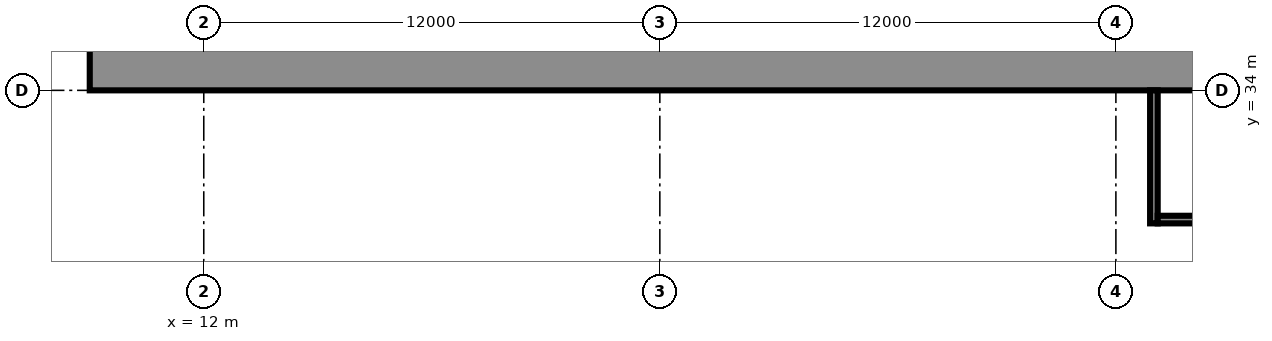
"""IFC4 building model, lengths in metres.
Left out: names, types, materials, properties, quantities, classifications, styles, units other than length and angle.
Written with IfcOpenShell. Run it as: python <this file> out.ifc"""

import sys

from ifc_helpers import new_model, si_unit, direction, frame, frame_2d, origin, origin_2d, place, context, subcontext, project, spatial, rectangle, extrude, element, fill, save


model = new_model("IFC4")
c1 = context("Model", 3, precision=1e-05, world=origin(), true_north=direction((0.0, 1.0)))
c2 = subcontext(c1, "Body", "Model", "MODEL_VIEW")
j1 = project(units=[si_unit("LENGTHUNIT", "METRE"), si_unit("PLANEANGLEUNIT", "RADIAN")], contexts=[c1])
p1 = place(None, origin())
s1 = spatial("IfcSite", under=j1, at=p1, CompositionType="ELEMENT")
p2 = place(p1, origin())
s2 = spatial("IfcBuilding", under=s1, at=p2, CompositionType="ELEMENT")
p3 = place(p2, origin())
s3 = spatial("IfcBuildingStorey", under=s2, at=p3, CompositionType="ELEMENT", Elevation=0.0)
for number, where, z_axis, x_axis in (
    (1, (28.0, 32.0, 0.0), (0.0, 0.0, 1.0), (1.0, 0.0, 0.0)),
    (2, (16.0, 32.0, 0.0), (0.0, 0.0, 1.0), (1.0, 0.0, 0.0)),
    (3, (8.0, 32.0, 0.0), (0.0, 0.0, 1.0), (1.0, 0.0, 0.0)),
):
    element("IfcColumn", number, at=place(p3, frame(where, z_axis=z_axis, x_axis=x_axis)), inside=s3, PredefinedType="COLUMN", context=c2, shape_type="SweptSolid", body=[
        extrude(rectangle(XDim=1.0, YDim=1.0, at=origin_2d()), origin(), (0.0, 0.0, 1.0), 8.0),
    ])
p4 = place(p3, frame((9.0, 34.6, 0.0), z_axis=(0.0, 0.0, 1.0), x_axis=(1.0, 0.0, 0.0)))
e4 = element("IfcWall", 4, at=p4, inside=s3, PredefinedType="SHEAR", context=c2, shape_type="SweptSolid", body=[
    extrude(rectangle(XDim=56.0, YDim=1.2, at=frame_2d((28.0, 0.0))), origin(), (0.0, 0.0, 1.0), 7.7),
])
p5 = place(p4, frame((3.3, 0.0, 0.0)))
e5 = element("IfcOpeningElement", 5, at=p5, cuts=e4, PredefinedType="OPENING", context=c2, shape_type="SweptSolid", body=[
    extrude(rectangle(XDim=1.0, YDim=2.1, at=frame_2d((0.5, 1.05))), frame((0.0, 0.61, 0.0), z_axis=(0.0, -1.0, 0.0), x_axis=(1.0, 0.0, 0.0)), (0.0, 0.0, 1.0), 1.22),
])
p6 = place(p4, frame((7.867, 0.0, 0.0)))
e6 = element("IfcOpeningElement", 6, at=p6, cuts=e4, PredefinedType="OPENING", context=c2, shape_type="SweptSolid", body=[
    extrude(rectangle(XDim=1.1, YDim=2.1, at=frame_2d((0.55, 1.05))), frame((0.0, 0.61, 0.0), z_axis=(0.0, -1.0, 0.0), x_axis=(1.0, 0.0, 0.0)), (0.0, 0.0, 1.0), 1.22),
])
p7 = place(p4, frame((12.033, 0.0, 0.0)))
e7 = element("IfcOpeningElement", 7, at=p7, cuts=e4, PredefinedType="OPENING", context=c2, shape_type="SweptSolid", body=[
    extrude(rectangle(XDim=1.1, YDim=2.1, at=frame_2d((0.55, 1.05))), frame((0.0, 0.61, 0.0), z_axis=(0.0, -1.0, 0.0), x_axis=(1.0, 0.0, 0.0)), (0.0, 0.0, 1.0), 1.22),
])
p8 = place(p4, frame((9.8, 0.0, 0.0)))
e8 = element("IfcOpeningElement", 8, at=p8, cuts=e4, PredefinedType="OPENING", context=c2, shape_type="SweptSolid", body=[
    extrude(rectangle(XDim=1.4, YDim=2.1, at=frame_2d((0.7, 1.05))), frame((0.0, 0.61, 0.0), z_axis=(0.0, -1.0, 0.0), x_axis=(1.0, 0.0, 0.0)), (0.0, 0.0, 1.0), 1.22),
])
p9 = place(p4, frame((14.65, 0.0, 0.0)))
e9 = element("IfcOpeningElement", 9, at=p9, cuts=e4, PredefinedType="OPENING", context=c2, shape_type="SweptSolid", body=[
    extrude(rectangle(XDim=1.2, YDim=2.1, at=frame_2d((0.6, 1.05))), frame((0.0, 0.61, 0.0), z_axis=(0.0, -1.0, 0.0), x_axis=(1.0, 0.0, 0.0)), (0.0, 0.0, 1.0), 1.22),
])
p10 = place(p4, frame((21.867, 0.0, 0.0)))
e10 = element("IfcOpeningElement", 10, at=p10, cuts=e4, PredefinedType="OPENING", context=c2, shape_type="SweptSolid", body=[
    extrude(rectangle(XDim=1.1, YDim=2.1, at=frame_2d((0.55, 1.05))), frame((0.0, 0.61, 0.0), z_axis=(0.0, -1.0, 0.0), x_axis=(1.0, 0.0, 0.0)), (0.0, 0.0, 1.0), 1.22),
])
p11 = place(p4, frame((26.033, 0.0, 0.0)))
e11 = element("IfcOpeningElement", 11, at=p11, cuts=e4, PredefinedType="OPENING", context=c2, shape_type="SweptSolid", body=[
    extrude(rectangle(XDim=1.1, YDim=2.1, at=frame_2d((0.55, 1.05))), frame((0.0, 0.61, 0.0), z_axis=(0.0, -1.0, 0.0), x_axis=(1.0, 0.0, 0.0)), (0.0, 0.0, 1.0), 1.22),
])
p12 = place(p4, frame((23.8, 0.0, 0.0)))
e12 = element("IfcOpeningElement", 12, at=p12, cuts=e4, PredefinedType="OPENING", context=c2, shape_type="SweptSolid", body=[
    extrude(rectangle(XDim=1.4, YDim=2.1, at=frame_2d((0.7, 1.05))), frame((0.0, 0.61, 0.0), z_axis=(0.0, -1.0, 0.0), x_axis=(1.0, 0.0, 0.0)), (0.0, 0.0, 1.0), 1.22),
])
p13 = place(p4, frame((28.867, 0.0, 0.0)))
e13 = element("IfcOpeningElement", 13, at=p13, cuts=e4, PredefinedType="OPENING", context=c2, shape_type="SweptSolid", body=[
    extrude(rectangle(XDim=1.1, YDim=2.1, at=frame_2d((0.55, 1.05))), frame((0.0, 0.61, 0.0), z_axis=(0.0, -1.0, 0.0), x_axis=(1.0, 0.0, 0.0)), (0.0, 0.0, 1.0), 1.22),
])
p14 = place(p4, frame((33.033, 0.0, 0.0)))
e14 = element("IfcOpeningElement", 14, at=p14, cuts=e4, PredefinedType="OPENING", context=c2, shape_type="SweptSolid", body=[
    extrude(rectangle(XDim=1.1, YDim=2.1, at=frame_2d((0.55, 1.05))), frame((0.0, 0.61, 0.0), z_axis=(0.0, -1.0, 0.0), x_axis=(1.0, 0.0, 0.0)), (0.0, 0.0, 1.0), 1.22),
])
p15 = place(p4, frame((40.15, 0.0, 0.0)))
e15 = element("IfcOpeningElement", 15, at=p15, cuts=e4, PredefinedType="OPENING", context=c2, shape_type="SweptSolid", body=[
    extrude(rectangle(XDim=1.2, YDim=2.1, at=frame_2d((0.6, 1.05))), frame((0.0, 0.61, 0.0), z_axis=(0.0, -1.0, 0.0), x_axis=(1.0, 0.0, 0.0)), (0.0, 0.0, 1.0), 1.22),
])
p16 = place(p4, frame((42.867, 0.0, 0.0)))
e16 = element("IfcOpeningElement", 16, at=p16, cuts=e4, PredefinedType="OPENING", context=c2, shape_type="SweptSolid", body=[
    extrude(rectangle(XDim=1.1, YDim=2.1, at=frame_2d((0.55, 1.05))), frame((0.0, 0.61, 0.0), z_axis=(0.0, -1.0, 0.0), x_axis=(1.0, 0.0, 0.0)), (0.0, 0.0, 1.0), 1.22),
])
p17 = place(p4, frame((47.033, 0.0, 0.0)))
e17 = element("IfcOpeningElement", 17, at=p17, cuts=e4, PredefinedType="OPENING", context=c2, shape_type="SweptSolid", body=[
    extrude(rectangle(XDim=1.1, YDim=2.1, at=frame_2d((0.55, 1.05))), frame((0.0, 0.61, 0.0), z_axis=(0.0, -1.0, 0.0), x_axis=(1.0, 0.0, 0.0)), (0.0, 0.0, 1.0), 1.22),
])
p18 = place(p4, frame((44.8, 0.0, 0.0)))
e18 = element("IfcOpeningElement", 18, at=p18, cuts=e4, PredefinedType="OPENING", context=c2, shape_type="SweptSolid", body=[
    extrude(rectangle(XDim=1.4, YDim=2.1, at=frame_2d((0.7, 1.05))), frame((0.0, 0.61, 0.0), z_axis=(0.0, -1.0, 0.0), x_axis=(1.0, 0.0, 0.0)), (0.0, 0.0, 1.0), 1.22),
])
p19 = place(p4, frame((49.867, 0.0, 0.0)))
e19 = element("IfcOpeningElement", 19, at=p19, cuts=e4, PredefinedType="OPENING", context=c2, shape_type="SweptSolid", body=[
    extrude(rectangle(XDim=1.1, YDim=2.1, at=frame_2d((0.55, 1.05))), frame((0.0, 0.61, 0.0), z_axis=(0.0, -1.0, 0.0), x_axis=(1.0, 0.0, 0.0)), (0.0, 0.0, 1.0), 1.22),
])
p20 = place(p4, frame((53.5, 0.0, 0.0)))
e20 = element("IfcOpeningElement", 20, at=p20, cuts=e4, PredefinedType="OPENING", context=c2, shape_type="SweptSolid", body=[
    extrude(rectangle(XDim=1.1, YDim=2.1, at=frame_2d((0.55, 1.05))), frame((0.0, 0.61, 0.0), z_axis=(0.0, -1.0, 0.0), x_axis=(1.0, 0.0, 0.0)), (0.0, 0.0, 1.0), 1.22),
])
p21 = place(p4, frame((51.567, 0.0, 0.0)))
e21 = element("IfcOpeningElement", 21, at=p21, cuts=e4, PredefinedType="OPENING", context=c2, shape_type="SweptSolid", body=[
    extrude(rectangle(XDim=1.4, YDim=2.1, at=frame_2d((0.7, 1.05))), frame((0.0, 0.61, 0.0), z_axis=(0.0, -1.0, 0.0), x_axis=(1.0, 0.0, 0.0)), (0.0, 0.0, 1.0), 1.22),
])
p22 = place(p3, frame((37.0, 30.5, 0.0), z_axis=(0.0, 0.0, 1.0), x_axis=(0.0, 1.0, 0.0)))
e22 = element("IfcWall", 22, at=p22, inside=s3, PredefinedType="PARTITIONING", context=c2, shape_type="SweptSolid", body=[
    extrude(rectangle(XDim=3.5, YDim=0.2, at=frame_2d((1.75, 0.0))), origin(), (0.0, 0.0, 1.0), 7.7),
])
p23 = place(p22, frame((1.2, 0.0, 0.0)))
e23 = element("IfcOpeningElement", 23, at=p23, cuts=e22, PredefinedType="OPENING", context=c2, shape_type="SweptSolid", body=[
    extrude(rectangle(XDim=1.1, YDim=2.1, at=frame_2d((0.55, 1.05))), frame((0.0, 0.11, 0.0), z_axis=(0.0, -1.0, 0.0), x_axis=(1.0, 0.0, 0.0)), (0.0, 0.0, 1.0), 0.22),
])
p24 = place(p3, frame((37.1, 30.6, 0.0), z_axis=(0.0, 0.0, 1.0), x_axis=(1.0, 0.0, 0.0)))
e24 = element("IfcWall", 24, at=p24, inside=s3, PredefinedType="PARTITIONING", context=c2, shape_type="SweptSolid", body=[
    extrude(rectangle(XDim=2.8, YDim=0.2, at=frame_2d((1.4, 0.0))), origin(), (0.0, 0.0, 1.0), 7.7),
])
p25 = place(p5, origin())
e25 = element("IfcDoor", 25, at=p25, inside=s3, OperationType="SINGLE_SWING_LEFT", PredefinedType="DOOR", context=c2, shape_type="SweptSolid", body=[
    extrude(rectangle(XDim=1.0, YDim=2.1, at=frame_2d((0.5, 1.05))), frame((0.0, 0.6, 0.0), z_axis=(0.0, -1.0, 0.0), x_axis=(1.0, 0.0, 0.0)), (0.0, 0.0, 1.0), 1.199),
])
fill(e5, e25)
p26 = place(p6, origin())
e26 = element("IfcDoor", 26, at=p26, inside=s3, OperationType="DOUBLE_DOOR_SLIDING", PredefinedType="DOOR", context=c2, shape_type="SweptSolid", body=[
    extrude(rectangle(XDim=1.1, YDim=2.1, at=frame_2d((0.55, 1.05))), frame((0.0, 0.025, 0.0), z_axis=(0.0, -1.0, 0.0), x_axis=(1.0, 0.0, 0.0)), (0.0, 0.0, 1.0), 0.05),
])
fill(e6, e26)
p27 = place(p7, origin())
e27 = element("IfcDoor", 27, at=p27, inside=s3, OperationType="DOUBLE_DOOR_SLIDING", PredefinedType="DOOR", context=c2, shape_type="SweptSolid", body=[
    extrude(rectangle(XDim=1.1, YDim=2.1, at=frame_2d((0.55, 1.05))), frame((0.0, 0.025, 0.0), z_axis=(0.0, -1.0, 0.0), x_axis=(1.0, 0.0, 0.0)), (0.0, 0.0, 1.0), 0.05),
])
fill(e7, e27)
p28 = place(p8, origin())
e28 = element("IfcDoor", 28, at=p28, inside=s3, OperationType="DOUBLE_DOOR_SINGLE_SWING", PredefinedType="DOOR", context=c2, shape_type="SweptSolid", body=[
    extrude(rectangle(XDim=1.4, YDim=2.1, at=frame_2d((0.7, 1.05))), frame((0.0, 0.025, 0.0), z_axis=(0.0, -1.0, 0.0), x_axis=(1.0, 0.0, 0.0)), (0.0, 0.0, 1.0), 0.05),
])
fill(e8, e28)
p29 = place(p9, origin())
e29 = element("IfcDoor", 29, at=p29, inside=s3, OperationType="SINGLE_SWING_LEFT", PredefinedType="DOOR", context=c2, shape_type="SweptSolid", body=[
    extrude(rectangle(XDim=1.2, YDim=2.1, at=frame_2d((0.6, 1.05))), frame((0.0, 0.025, 0.0), z_axis=(0.0, -1.0, 0.0), x_axis=(1.0, 0.0, 0.0)), (0.0, 0.0, 1.0), 0.05),
])
fill(e9, e29)
p30 = place(p10, origin())
e30 = element("IfcDoor", 30, at=p30, inside=s3, OperationType="DOUBLE_DOOR_SLIDING", PredefinedType="DOOR", context=c2, shape_type="SweptSolid", body=[
    extrude(rectangle(XDim=1.1, YDim=2.1, at=frame_2d((0.55, 1.05))), frame((0.0, 0.025, 0.0), z_axis=(0.0, -1.0, 0.0), x_axis=(1.0, 0.0, 0.0)), (0.0, 0.0, 1.0), 0.05),
])
fill(e10, e30)
p31 = place(p11, origin())
e31 = element("IfcDoor", 31, at=p31, inside=s3, OperationType="DOUBLE_DOOR_SLIDING", PredefinedType="DOOR", context=c2, shape_type="SweptSolid", body=[
    extrude(rectangle(XDim=1.1, YDim=2.1, at=frame_2d((0.55, 1.05))), frame((0.0, 0.025, 0.0), z_axis=(0.0, -1.0, 0.0), x_axis=(1.0, 0.0, 0.0)), (0.0, 0.0, 1.0), 0.05),
])
fill(e11, e31)
p32 = place(p12, origin())
e32 = element("IfcDoor", 32, at=p32, inside=s3, OperationType="DOUBLE_DOOR_SINGLE_SWING", PredefinedType="DOOR", context=c2, shape_type="SweptSolid", body=[
    extrude(rectangle(XDim=1.4, YDim=2.1, at=frame_2d((0.7, 1.05))), frame((0.0, 0.025, 0.0), z_axis=(0.0, -1.0, 0.0), x_axis=(1.0, 0.0, 0.0)), (0.0, 0.0, 1.0), 0.05),
])
fill(e12, e32)
p33 = place(p13, origin())
e33 = element("IfcDoor", 33, at=p33, inside=s3, OperationType="DOUBLE_DOOR_SLIDING", PredefinedType="DOOR", context=c2, shape_type="SweptSolid", body=[
    extrude(rectangle(XDim=1.1, YDim=2.1, at=frame_2d((0.55, 1.05))), frame((0.0, 0.025, 0.0), z_axis=(0.0, -1.0, 0.0), x_axis=(1.0, 0.0, 0.0)), (0.0, 0.0, 1.0), 0.05),
])
fill(e13, e33)
p34 = place(p23, origin())
e34 = element("IfcDoor", 34, at=p34, inside=s3, OperationType="SINGLE_SWING_LEFT", PredefinedType="DOOR", context=c2, shape_type="SweptSolid", body=[
    extrude(rectangle(XDim=1.1, YDim=2.1, at=frame_2d((0.55, 1.05))), frame((0.0, 0.025, 0.0), z_axis=(0.0, -1.0, 0.0), x_axis=(1.0, 0.0, 0.0)), (0.0, 0.0, 1.0), 0.05),
])
fill(e23, e34)
save(model, sys.argv[1])
